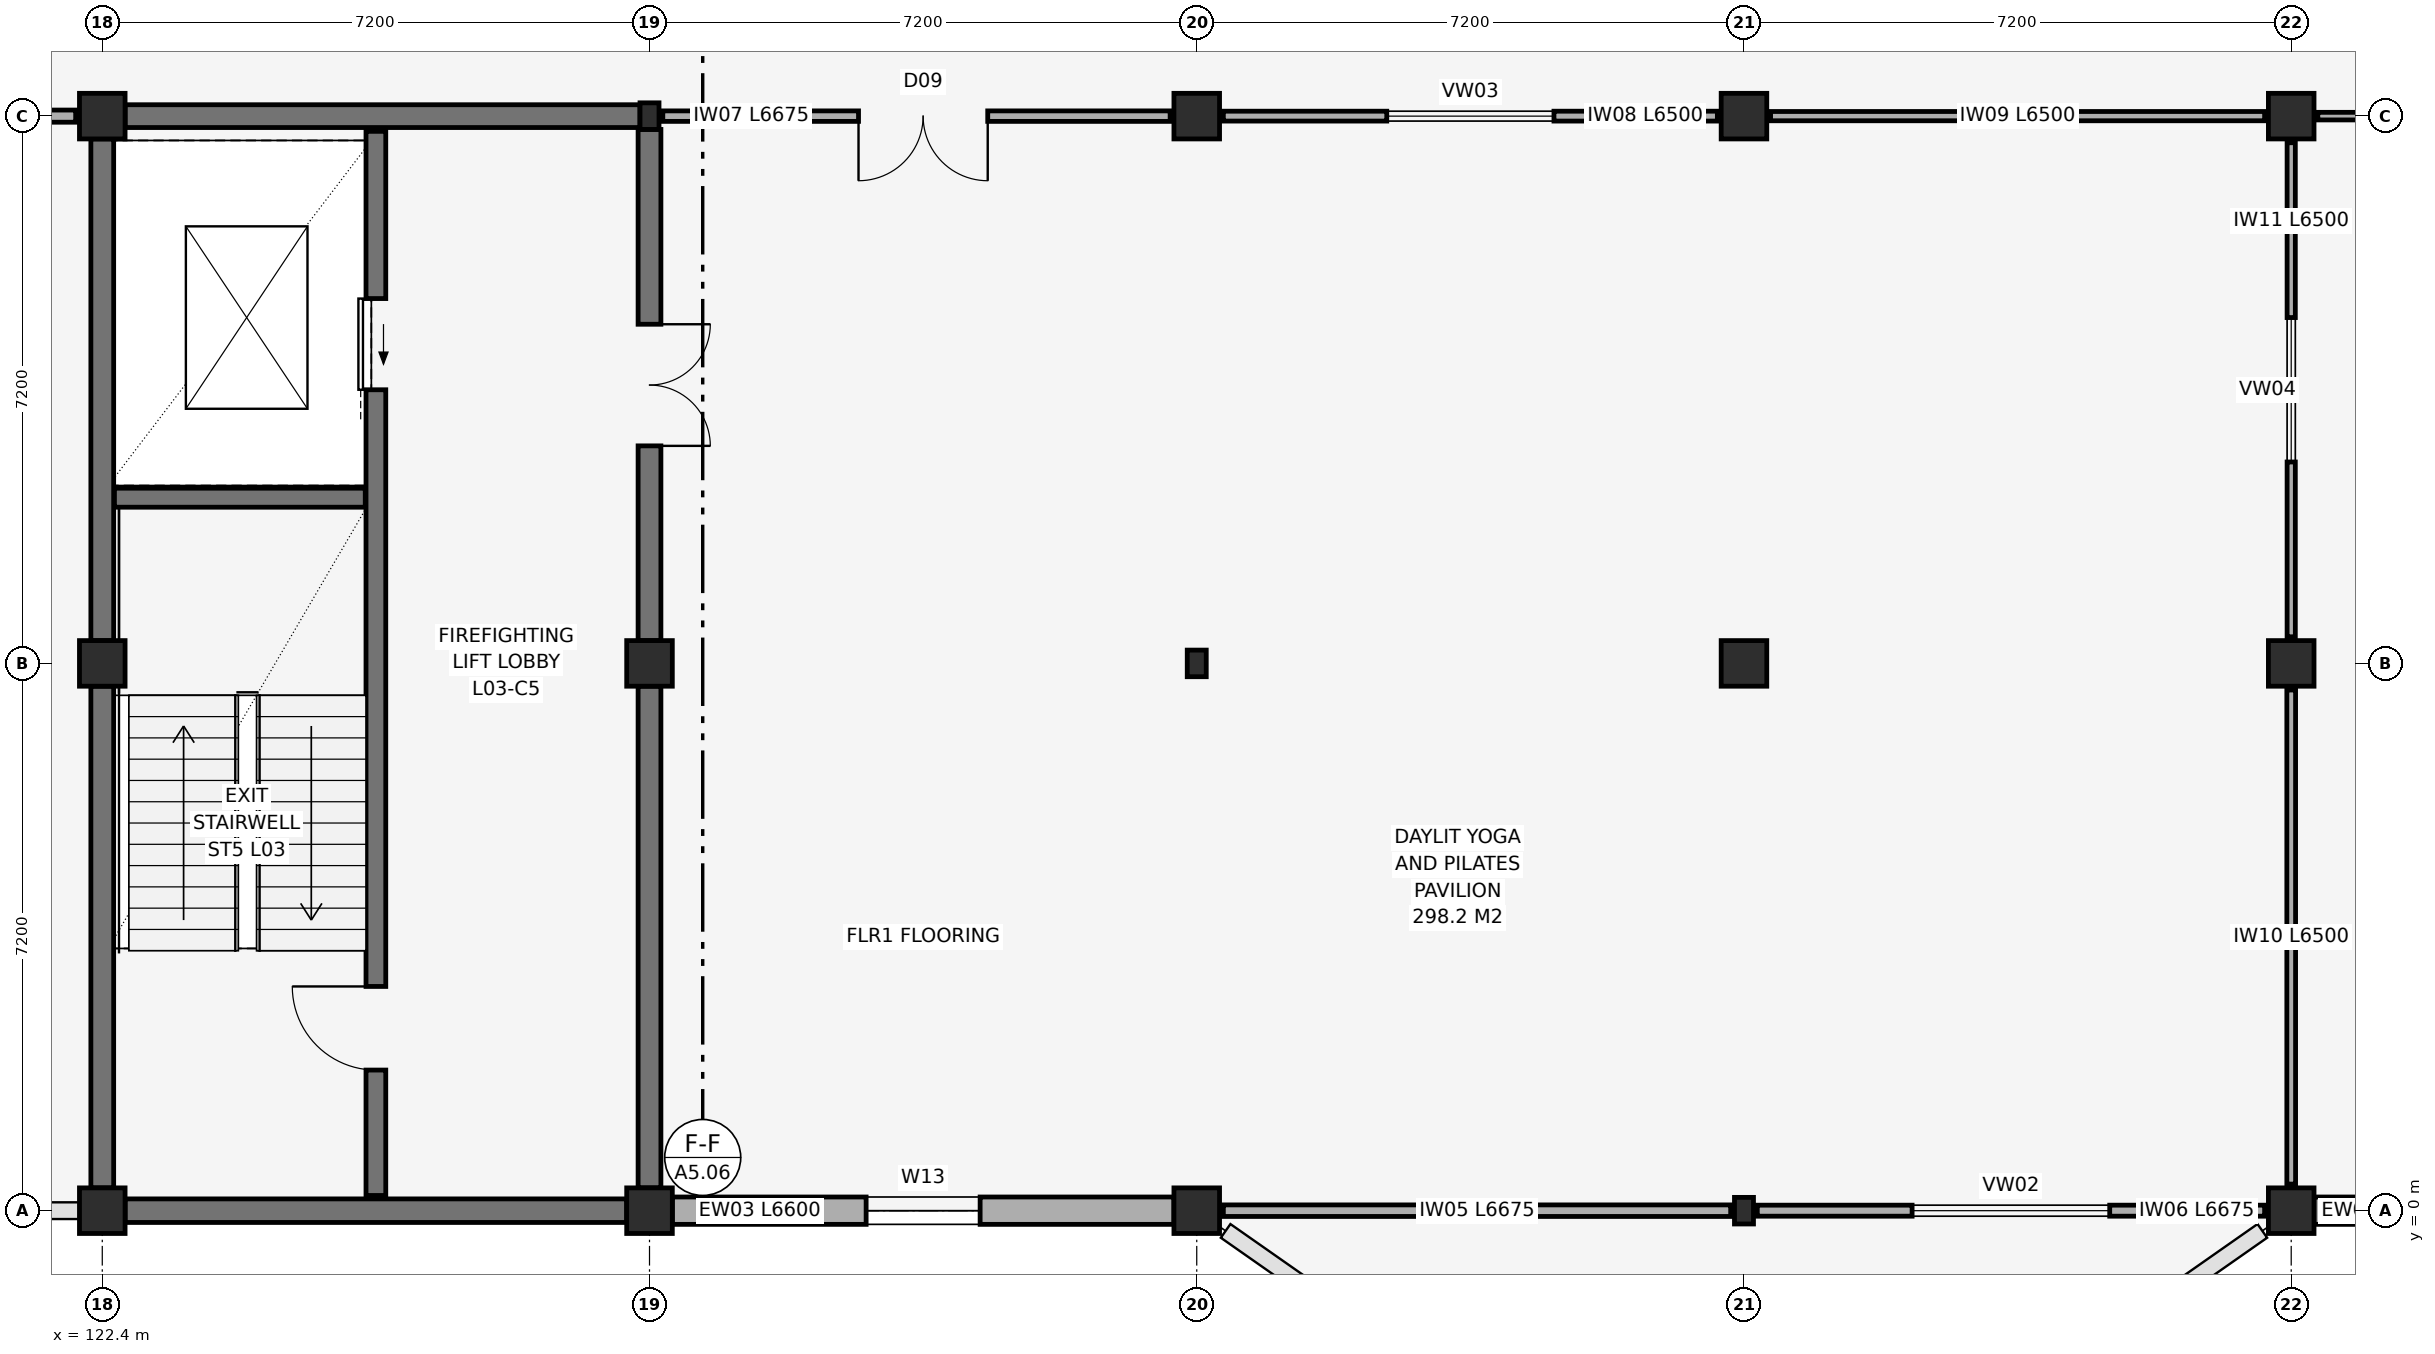
"""IFC4 building model, lengths in metres.
Left out: names, types, materials, properties, quantities, classifications, styles, units other than length and angle.
Written with IfcOpenShell. Run it as: python <this file> out.ifc"""

import sys

from ifc_helpers import new_model, si_unit, direction, frame, frame_2d, origin, origin_2d, place, context, subcontext, project, spatial, rectangle, hollow_rectangle, extrude, element, fill, save


model = new_model("IFC4")
c1 = context("Model", 3, precision=1e-05, world=origin(), true_north=direction((0.0, 1.0)))
c2 = subcontext(c1, "Body", "Model", "MODEL_VIEW")
j1 = project(units=[si_unit("LENGTHUNIT", "METRE"), si_unit("PLANEANGLEUNIT", "RADIAN")], contexts=[c1])
p1 = place(None, origin())
s1 = spatial("IfcSite", under=j1, at=p1, CompositionType="ELEMENT")
p2 = place(p1, origin())
s2 = spatial("IfcBuilding", under=s1, at=p2, CompositionType="ELEMENT")
p3 = place(p2, frame((0.0, 0.0, 15.0)))
s3 = spatial("IfcBuildingStorey", under=s2, at=p3, CompositionType="ELEMENT", Elevation=15.0)
for number, where, z_axis, x_axis in (
    (1, (122.4, 0.0, 0.0), (0.0, 0.0, 1.0), (1.0, 0.0, 0.0)),
    (2, (122.4, 7.2, 0.0), (0.0, 0.0, 1.0), (1.0, 0.0, 0.0)),
    (3, (122.4, 14.4, 0.0), (0.0, 0.0, 1.0), (1.0, 0.0, 0.0)),
    (4, (129.6, 0.0, 0.0), (0.0, 0.0, 1.0), (1.0, 0.0, 0.0)),
    (5, (129.6, 7.2, 0.0), (0.0, 0.0, 1.0), (1.0, 0.0, 0.0)),
):
    element("IfcColumn", number, at=place(p3, frame(where, z_axis=z_axis, x_axis=x_axis)), inside=s3, PredefinedType="COLUMN", context=c2, shape_type="SweptSolid", body=[
        extrude(rectangle(XDim=0.6, YDim=0.6, at=origin_2d()), origin(), (0.0, 0.0, 1.0), 4.2),
    ])
p4 = place(p3, frame((129.6, 14.4, 0.0), z_axis=(0.0, 0.0, 1.0), x_axis=(1.0, 0.0, 0.0)))
e6 = element("IfcColumn", 6, at=p4, inside=s3, PredefinedType="COLUMN", context=c2, shape_type="SweptSolid", body=[
    extrude(hollow_rectangle(XDim=0.25, YDim=0.35, WallThickness=0.012, at=origin_2d()), origin(), (0.0, 0.0, 1.0), 4.2),
])
p5 = place(p3, frame((136.8, 0.0, 0.0), z_axis=(0.0, 0.0, 1.0), x_axis=(1.0, 0.0, 0.0)))
e7 = element("IfcColumn", 7, at=p5, inside=s3, PredefinedType="COLUMN", context=c2, shape_type="SweptSolid", body=[
    extrude(rectangle(XDim=0.6, YDim=0.6, at=origin_2d()), origin(), (0.0, 0.0, 1.0), 4.2),
])
p6 = place(p3, frame((136.8, 7.2, 0.0), z_axis=(0.0, 0.0, 1.0), x_axis=(1.0, 0.0, 0.0)))
e8 = element("IfcColumn", 8, at=p6, inside=s3, PredefinedType="COLUMN", context=c2, shape_type="SweptSolid", body=[
    extrude(hollow_rectangle(XDim=0.25, YDim=0.35, WallThickness=0.012, at=origin_2d()), origin(), (0.0, 0.0, 1.0), 4.2),
])
p7 = place(p3, frame((136.8, 14.4, 0.0), z_axis=(0.0, 0.0, 1.0), x_axis=(1.0, 0.0, 0.0)))
e9 = element("IfcColumn", 9, at=p7, inside=s3, PredefinedType="COLUMN", context=c2, shape_type="SweptSolid", body=[
    extrude(rectangle(XDim=0.6, YDim=0.6, at=origin_2d()), origin(), (0.0, 0.0, 1.0), 4.2),
])
p8 = place(p3, frame((144.0, 0.0, 0.0), z_axis=(0.0, 0.0, 1.0), x_axis=(1.0, 0.0, 0.0)))
e10 = element("IfcColumn", 10, at=p8, inside=s3, PredefinedType="COLUMN", context=c2, shape_type="SweptSolid", body=[
    extrude(hollow_rectangle(XDim=0.25, YDim=0.35, WallThickness=0.012, at=origin_2d()), origin(), (0.0, 0.0, 1.0), 4.2),
])
for number, where, z_axis, x_axis in (
    (11, (144.0, 7.2, 0.0), (0.0, 0.0, 1.0), (1.0, 0.0, 0.0)),
    (12, (144.0, 14.4, 0.0), (0.0, 0.0, 1.0), (1.0, 0.0, 0.0)),
    (13, (151.2, 0.0, 0.0), (0.0, 0.0, 1.0), (1.0, 0.0, 0.0)),
    (14, (151.2, 7.2, 0.0), (0.0, 0.0, 1.0), (1.0, 0.0, 0.0)),
    (15, (151.2, 14.4, 0.0), (0.0, 0.0, 1.0), (1.0, 0.0, 0.0)),
):
    element("IfcColumn", number, at=place(p3, frame(where, z_axis=z_axis, x_axis=x_axis)), inside=s3, PredefinedType="COLUMN", context=c2, shape_type="SweptSolid", body=[
        extrude(rectangle(XDim=0.6, YDim=0.6, at=origin_2d()), origin(), (0.0, 0.0, 1.0), 4.2),
    ])
p9 = place(p3, frame((129.9, 0.0, 0.0), z_axis=(0.0, 0.0, 1.0), x_axis=(1.0, 0.0, 0.0)))
e16 = element("IfcWall", 16, at=p9, inside=s3, PredefinedType="SOLIDWALL", context=c2, shape_type="SweptSolid", body=[
    extrude(rectangle(XDim=6.6, YDim=0.36, at=frame_2d((3.3, 0.0))), origin(), (0.0, 0.0, 1.0), 3.16),
])
p10 = place(p9, frame((2.55, 0.0, 0.95)))
e17 = element("IfcOpeningElement", 17, at=p10, cuts=e16, PredefinedType="OPENING", context=c2, shape_type="SweptSolid", body=[
    extrude(rectangle(XDim=1.5, YDim=1.75, at=frame_2d((0.75, 0.875))), frame((0.0, 0.195, 0.0), z_axis=(0.0, -1.0, 0.0), x_axis=(1.0, 0.0, 0.0)), (0.0, 0.0, 1.0), 0.39),
])
p11 = place(p3, frame((151.5, 0.0, 0.0), z_axis=(0.0, 0.0, 1.0), x_axis=(1.0, 0.0, 0.0)))
e18 = element("IfcWall", 18, at=p11, inside=s3, PredefinedType="SOLIDWALL", context=c2, shape_type="SweptSolid", body=[
    extrude(rectangle(XDim=6.6, YDim=0.36, at=frame_2d((3.3, 0.0))), origin(), (0.0, 0.0, 1.0), 3.16),
])
p12 = place(p11, frame((2.05, 0.0, 0.95)))
e19 = element("IfcOpeningElement", 19, at=p12, cuts=e18, PredefinedType="OPENING", context=c2, shape_type="SweptSolid", body=[
    extrude(rectangle(XDim=2.5, YDim=1.35, at=frame_2d((1.25, 0.675))), frame((0.0, 0.195, 0.0), z_axis=(0.0, -1.0, 0.0), x_axis=(1.0, 0.0, 0.0)), (0.0, 0.0, 1.0), 0.39),
])
p13 = place(p3, frame((122.7, 0.0, 0.0), z_axis=(0.0, 0.0, 1.0), x_axis=(1.0, 0.0, 0.0)))
e20 = element("IfcWall", 20, at=p13, inside=s3, PredefinedType="SHEAR", context=c2, shape_type="SweptSolid", body=[
    extrude(rectangle(XDim=6.6, YDim=0.31, at=frame_2d((3.3, 0.0))), origin(), (0.0, 0.0, 1.0), 3.96),
])
p14 = place(p3, frame((122.7, 14.4, 0.0), z_axis=(0.0, 0.0, 1.0), x_axis=(1.0, 0.0, 0.0)))
e21 = element("IfcWall", 21, at=p14, inside=s3, PredefinedType="SHEAR", context=c2, shape_type="SweptSolid", body=[
    extrude(rectangle(XDim=6.775, YDim=0.3, at=frame_2d((3.388, 0.0))), origin(), (0.0, 0.0, 1.0), 3.96),
])
p15 = place(p3, frame((122.4, 0.3, 0.0), z_axis=(0.0, 0.0, 1.0), x_axis=(0.0, 1.0, 0.0)))
e22 = element("IfcWall", 22, at=p15, inside=s3, PredefinedType="SHEAR", context=c2, shape_type="SweptSolid", body=[
    extrude(rectangle(XDim=6.6, YDim=0.3, at=frame_2d((3.3, 0.0))), origin(), (0.0, 0.0, 1.0), 3.96),
])
p16 = place(p3, frame((122.4, 7.5, 0.0), z_axis=(0.0, 0.0, 1.0), x_axis=(0.0, 1.0, 0.0)))
e23 = element("IfcWall", 23, at=p16, inside=s3, PredefinedType="SHEAR", context=c2, shape_type="SweptSolid", body=[
    extrude(rectangle(XDim=6.6, YDim=0.3, at=frame_2d((3.3, 0.0))), origin(), (0.0, 0.0, 1.0), 3.96),
])
p17 = place(p3, frame((129.6, 0.3, 0.0), z_axis=(0.0, 0.0, 1.0), x_axis=(0.0, 1.0, 0.0)))
e24 = element("IfcWall", 24, at=p17, inside=s3, PredefinedType="SHEAR", context=c2, shape_type="SweptSolid", body=[
    extrude(rectangle(XDim=6.6, YDim=0.3, at=frame_2d((3.3, 0.0))), origin(), (0.0, 0.0, 1.0), 3.96),
])
p18 = place(p3, frame((129.6, 7.5, 0.0), z_axis=(0.0, 0.0, 1.0), x_axis=(0.0, 1.0, 0.0)))
e25 = element("IfcWall", 25, at=p18, inside=s3, PredefinedType="SHEAR", context=c2, shape_type="SweptSolid", body=[
    extrude(rectangle(XDim=6.725, YDim=0.3, at=frame_2d((3.363, 0.0))), origin(), (0.0, 0.0, 1.0), 3.96),
])
p19 = place(p18, frame((2.562, 0.0, 0.0)))
e26 = element("IfcOpeningElement", 26, at=p19, cuts=e25, PredefinedType="OPENING", context=c2, shape_type="SweptSolid", body=[
    extrude(rectangle(XDim=1.6, YDim=2.2, at=frame_2d((0.8, 1.1))), frame((0.0, 0.165, 0.0), z_axis=(0.0, -1.0, 0.0), x_axis=(1.0, 0.0, 0.0)), (0.0, 0.0, 1.0), 0.33),
])
p20 = place(p3, frame((126.0, 0.2, 0.0), z_axis=(0.0, 0.0, 1.0), x_axis=(0.0, 1.0, 0.0)))
e27 = element("IfcWall", 27, at=p20, inside=s3, PredefinedType="SHEAR", context=c2, shape_type="SweptSolid", body=[
    extrude(rectangle(XDim=14.0, YDim=0.26, at=frame_2d((7.0, 0.0))), origin(), (0.0, 0.0, 1.0), 3.96),
])
p21 = place(p20, frame((1.65, 0.0, 0.0)))
e28 = element("IfcOpeningElement", 28, at=p21, cuts=e27, PredefinedType="OPENING", context=c2, shape_type="SweptSolid", body=[
    extrude(rectangle(XDim=1.1, YDim=2.15, at=frame_2d((0.55, 1.075))), frame((0.0, 0.145, 0.0), z_axis=(0.0, -1.0, 0.0), x_axis=(1.0, 0.0, 0.0)), (0.0, 0.0, 1.0), 0.29),
])
p22 = place(p20, frame((10.6, 0.0, 0.0)))
e29 = element("IfcOpeningElement", 29, at=p22, cuts=e27, PredefinedType="OPENING", context=c2, shape_type="SweptSolid", body=[
    extrude(rectangle(XDim=1.2, YDim=2.25, at=frame_2d((0.6, 1.125))), frame((0.0, 0.145, 0.0), z_axis=(0.0, -1.0, 0.0), x_axis=(1.0, 0.0, 0.0)), (0.0, 0.0, 1.0), 0.29),
])
p23 = place(p3, frame((122.56, 9.38, 0.0), z_axis=(0.0, 0.0, 1.0), x_axis=(1.0, 0.0, 0.0)))
e30 = element("IfcWall", 30, at=p23, inside=s3, PredefinedType="SHEAR", context=c2, shape_type="SweptSolid", body=[
    extrude(rectangle(XDim=3.3, YDim=0.25, at=frame_2d((1.65, 0.0))), origin(), (0.0, 0.0, 1.0), 3.96),
])
p24 = place(p3, frame((115.55, 14.4, 0.0), z_axis=(0.0, 0.0, 1.0), x_axis=(1.0, 0.0, 0.0)))
e31 = element("IfcWall", 31, at=p24, inside=s3, PredefinedType="PARTITIONING", context=c2, shape_type="SweptSolid", body=[
    extrude(rectangle(XDim=6.5, YDim=0.16, at=frame_2d((3.25, 0.0))), origin(), (0.0, 0.0, 1.0), 3.57),
])
p25 = place(p24, frame((2.79, 0.0, 0.0)))
e32 = element("IfcOpeningElement", 32, at=p25, cuts=e31, PredefinedType="OPENING", context=c2, shape_type="SweptSolid", body=[
    extrude(rectangle(XDim=0.92, YDim=2.1, at=frame_2d((0.46, 1.05))), frame((0.0, 0.095, 0.0), z_axis=(0.0, -1.0, 0.0), x_axis=(1.0, 0.0, 0.0)), (0.0, 0.0, 1.0), 0.19),
])
p26 = place(p3, frame((137.15, 0.0, 0.0), z_axis=(0.0, 0.0, 1.0), x_axis=(1.0, 0.0, 0.0)))
e33 = element("IfcWall", 33, at=p26, inside=s3, PredefinedType="PARTITIONING", context=c2, shape_type="SweptSolid", body=[
    extrude(rectangle(XDim=6.675, YDim=0.152, at=frame_2d((3.337, 0.0))), origin(), (0.0, 0.0, 1.0), 3.16),
])
p27 = place(p3, frame((144.175, 0.0, 0.0), z_axis=(0.0, 0.0, 1.0), x_axis=(1.0, 0.0, 0.0)))
e34 = element("IfcWall", 34, at=p27, inside=s3, PredefinedType="PARTITIONING", context=c2, shape_type="SweptSolid", body=[
    extrude(rectangle(XDim=6.675, YDim=0.145, at=frame_2d((3.337, 0.0))), origin(), (0.0, 0.0, 1.0), 3.16),
])
p28 = place(p27, frame((2.037, 0.0, 0.95)))
e35 = element("IfcOpeningElement", 35, at=p28, cuts=e34, PredefinedType="OPENING", context=c2, shape_type="SweptSolid", body=[
    extrude(rectangle(XDim=2.6, YDim=1.5, at=frame_2d((1.3, 0.75))), frame((0.0, 0.087, 0.0), z_axis=(0.0, -1.0, 0.0), x_axis=(1.0, 0.0, 0.0)), (0.0, 0.0, 1.0), 0.175),
])
p29 = place(p3, frame((129.775, 14.4, 0.0), z_axis=(0.0, 0.0, 1.0), x_axis=(1.0, 0.0, 0.0)))
e36 = element("IfcWall", 36, at=p29, inside=s3, PredefinedType="PARTITIONING", context=c2, shape_type="SweptSolid", body=[
    extrude(rectangle(XDim=6.675, YDim=0.138, at=frame_2d((3.337, 0.0))), origin(), (0.0, 0.0, 1.0), 3.57),
])
p30 = place(p29, frame((2.575, 0.0, 0.0)))
e37 = element("IfcOpeningElement", 37, at=p30, cuts=e36, PredefinedType="OPENING", context=c2, shape_type="SweptSolid", body=[
    extrude(rectangle(XDim=1.7, YDim=2.2, at=frame_2d((0.85, 1.1))), frame((0.0, 0.084, 0.0), z_axis=(0.0, -1.0, 0.0), x_axis=(1.0, 0.0, 0.0)), (0.0, 0.0, 1.0), 0.168),
])
p31 = place(p3, frame((137.15, 14.4, 0.0), z_axis=(0.0, 0.0, 1.0), x_axis=(1.0, 0.0, 0.0)))
e38 = element("IfcWall", 38, at=p31, inside=s3, PredefinedType="PARTITIONING", context=c2, shape_type="SweptSolid", body=[
    extrude(rectangle(XDim=6.5, YDim=0.13, at=frame_2d((3.25, 0.0))), origin(), (0.0, 0.0, 1.0), 3.57),
])
p32 = place(p31, frame((2.15, 0.0, 0.95)))
e39 = element("IfcOpeningElement", 39, at=p32, cuts=e38, PredefinedType="OPENING", context=c2, shape_type="SweptSolid", body=[
    extrude(rectangle(XDim=2.2, YDim=1.5, at=frame_2d((1.1, 0.75))), frame((0.0, 0.08, 0.0), z_axis=(0.0, -1.0, 0.0), x_axis=(1.0, 0.0, 0.0)), (0.0, 0.0, 1.0), 0.16),
])
p33 = place(p3, frame((144.35, 14.4, 0.0), z_axis=(0.0, 0.0, 1.0), x_axis=(1.0, 0.0, 0.0)))
e40 = element("IfcWall", 40, at=p33, inside=s3, PredefinedType="PARTITIONING", context=c2, shape_type="SweptSolid", body=[
    extrude(rectangle(XDim=6.5, YDim=0.122, at=frame_2d((3.25, 0.0))), origin(), (0.0, 0.0, 1.0), 3.57),
])
p34 = place(p3, frame((151.2, 0.35, 0.0), z_axis=(0.0, 0.0, 1.0), x_axis=(0.0, 1.0, 0.0)))
e41 = element("IfcWall", 41, at=p34, inside=s3, PredefinedType="PARTITIONING", context=c2, shape_type="SweptSolid", body=[
    extrude(rectangle(XDim=6.5, YDim=0.115, at=frame_2d((3.25, 0.0))), origin(), (0.0, 0.0, 1.0), 3.16),
])
p35 = place(p3, frame((151.2, 7.55, 0.0), z_axis=(0.0, 0.0, 1.0), x_axis=(0.0, 1.0, 0.0)))
e42 = element("IfcWall", 42, at=p35, inside=s3, PredefinedType="PARTITIONING", context=c2, shape_type="SweptSolid", body=[
    extrude(rectangle(XDim=6.5, YDim=0.108, at=frame_2d((3.25, 0.0))), origin(), (0.0, 0.0, 1.0), 3.62),
])
p36 = place(p35, frame((2.3, 0.0, 0.95)))
e43 = element("IfcOpeningElement", 43, at=p36, cuts=e42, PredefinedType="OPENING", context=c2, shape_type="SweptSolid", body=[
    extrude(rectangle(XDim=1.9, YDim=1.5, at=frame_2d((0.95, 0.75))), frame((0.0, 0.069, 0.0), z_axis=(0.0, -1.0, 0.0), x_axis=(1.0, 0.0, 0.0)), (0.0, 0.0, 1.0), 0.138),
])
p37 = place(p3, frame((151.55, 14.4, 0.0), z_axis=(0.0, 0.0, 1.0), x_axis=(1.0, 0.0, 0.0)))
e44 = element("IfcWall", 44, at=p37, inside=s3, PredefinedType="PARTITIONING", context=c2, shape_type="SweptSolid", body=[
    extrude(rectangle(XDim=6.675, YDim=0.1, at=frame_2d((3.337, 0.0))), origin(), (0.0, 0.0, 1.0), 3.57),
])
p38 = place(p37, frame((2.425, 0.0, 0.0)))
e45 = element("IfcOpeningElement", 45, at=p38, cuts=e44, PredefinedType="OPENING", context=c2, shape_type="SweptSolid", body=[
    extrude(rectangle(XDim=1.65, YDim=2.2, at=frame_2d((0.825, 1.1))), frame((0.0, 0.065, 0.0), z_axis=(0.0, -1.0, 0.0), x_axis=(1.0, 0.0, 0.0)), (0.0, 0.0, 1.0), 0.13),
])
p39 = place(p10, origin())
e46 = element("IfcWindow", 46, at=p39, inside=s3, PartitioningType="SINGLE_PANEL", PredefinedType="WINDOW", context=c2, shape_type="SweptSolid", body=[
    extrude(rectangle(XDim=1.5, YDim=1.75, at=frame_2d((0.75, 0.875))), frame((0.0, 0.03, 0.0), z_axis=(0.0, -1.0, 0.0), x_axis=(1.0, 0.0, 0.0)), (0.0, 0.0, 1.0), 0.06),
])
fill(e17, e46)
p40 = place(p21, origin())
e47 = element("IfcDoor", 47, at=p40, inside=s3, OperationType="SINGLE_SWING_RIGHT", PredefinedType="DOOR", context=c2, shape_type="SweptSolid", body=[
    extrude(rectangle(XDim=1.1, YDim=2.15, at=frame_2d((0.55, 1.075))), frame((0.0, 0.025, 0.0), z_axis=(0.0, -1.0, 0.0), x_axis=(1.0, 0.0, 0.0)), (0.0, 0.0, 1.0), 0.05),
])
fill(e28, e47)
p41 = place(p22, frame((1.2, 0.0, 0.0), z_axis=(0.0, 0.0, 1.0), x_axis=(-1.0, 0.0, 0.0)))
e48 = element("IfcDoor", 48, at=p41, inside=s3, OperationType="SLIDING_TO_LEFT", PredefinedType="DOOR", context=c2, shape_type="SweptSolid", body=[
    extrude(rectangle(XDim=1.2, YDim=2.25, at=frame_2d((0.6, 1.125))), frame((0.0, 0.025, 0.0), z_axis=(0.0, -1.0, 0.0), x_axis=(1.0, 0.0, 0.0)), (0.0, 0.0, 1.0), 0.05),
])
fill(e29, e48)
p42 = place(p19, frame((1.6, 0.0, 0.0), z_axis=(0.0, 0.0, 1.0), x_axis=(-1.0, 0.0, 0.0)))
e49 = element("IfcDoor", 49, at=p42, inside=s3, OperationType="DOUBLE_SWING_LEFT", PredefinedType="DOOR", context=c2, shape_type="SweptSolid", body=[
    extrude(rectangle(XDim=1.6, YDim=2.2, at=frame_2d((0.8, 1.1))), frame((0.0, 0.025, 0.0), z_axis=(0.0, -1.0, 0.0), x_axis=(1.0, 0.0, 0.0)), (0.0, 0.0, 1.0), 0.05),
])
fill(e26, e49)
p43 = place(p28, origin())
e50 = element("IfcWindow", 50, at=p43, inside=s3, PartitioningType="SINGLE_PANEL", PredefinedType="WINDOW", context=c2, shape_type="SweptSolid", body=[
    extrude(rectangle(XDim=2.6, YDim=1.5, at=frame_2d((1.3, 0.75))), frame((0.0, 0.03, 0.0), z_axis=(0.0, -1.0, 0.0), x_axis=(1.0, 0.0, 0.0)), (0.0, 0.0, 1.0), 0.06),
])
fill(e35, e50)
p44 = place(p30, frame((1.7, 0.0, 0.0), z_axis=(0.0, 0.0, 1.0), x_axis=(-1.0, 0.0, 0.0)))
e51 = element("IfcDoor", 51, at=p44, inside=s3, OperationType="DOUBLE_SWING_LEFT", PredefinedType="DOOR", context=c2, shape_type="SweptSolid", body=[
    extrude(rectangle(XDim=1.7, YDim=2.2, at=frame_2d((0.85, 1.1))), frame((0.0, 0.025, 0.0), z_axis=(0.0, -1.0, 0.0), x_axis=(1.0, 0.0, 0.0)), (0.0, 0.0, 1.0), 0.05),
])
fill(e37, e51)
p45 = place(p32, origin())
e52 = element("IfcWindow", 52, at=p45, inside=s3, PartitioningType="SINGLE_PANEL", PredefinedType="WINDOW", context=c2, shape_type="SweptSolid", body=[
    extrude(rectangle(XDim=2.2, YDim=1.5, at=frame_2d((1.1, 0.75))), frame((0.0, 0.03, 0.0), z_axis=(0.0, -1.0, 0.0), x_axis=(1.0, 0.0, 0.0)), (0.0, 0.0, 1.0), 0.06),
])
fill(e39, e52)
p46 = place(p36, origin())
e53 = element("IfcWindow", 53, at=p46, inside=s3, PartitioningType="SINGLE_PANEL", PredefinedType="WINDOW", context=c2, shape_type="SweptSolid", body=[
    extrude(rectangle(XDim=1.9, YDim=1.5, at=frame_2d((0.95, 0.75))), frame((0.0, 0.03, 0.0), z_axis=(0.0, -1.0, 0.0), x_axis=(1.0, 0.0, 0.0)), (0.0, 0.0, 1.0), 0.06),
])
fill(e43, e53)
save(model, sys.argv[1])
